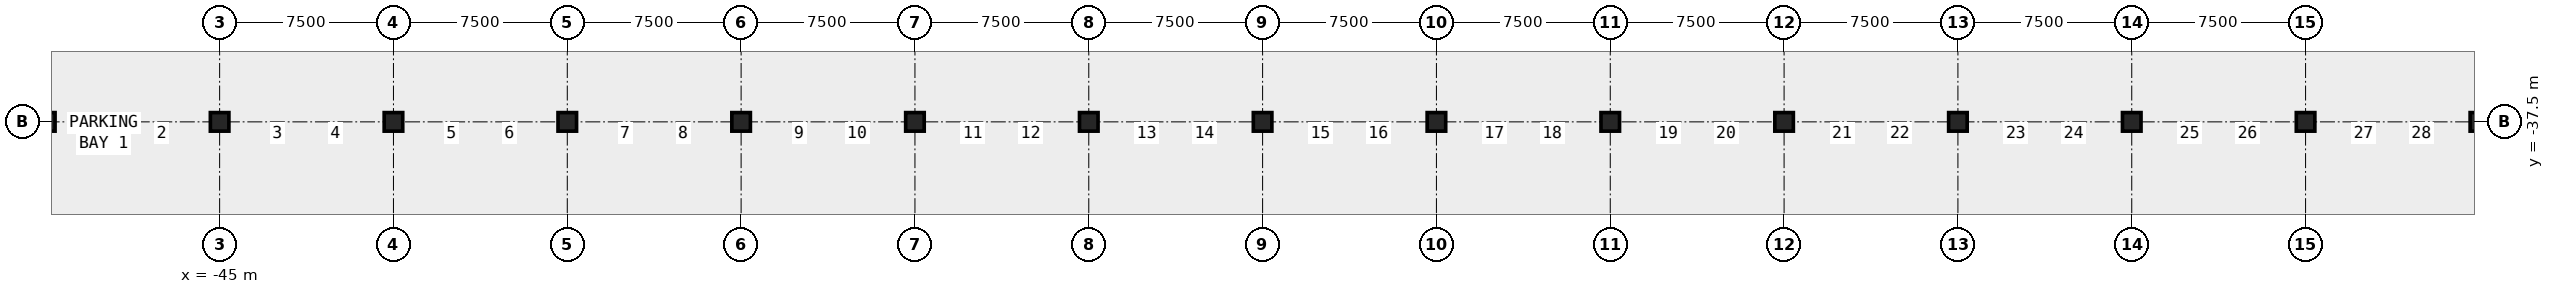
"""IFC4 building model, lengths in metres.
Left out: names, types, materials, properties, quantities, classifications, styles, units other than length and angle.
Written with IfcOpenShell. Run it as: python <this file> out.ifc"""

import sys

from ifc_helpers import new_model, si_unit, direction, frame, origin, origin_2d, place, context, subcontext, project, spatial, rectangle, extrude, element, save


model = new_model("IFC4")
c1 = context("Model", 3, precision=1e-05, world=origin(), true_north=direction((0.0, 1.0)))
c2 = subcontext(c1, "Body", "Model", "MODEL_VIEW")
j1 = project(units=[si_unit("LENGTHUNIT", "METRE"), si_unit("PLANEANGLEUNIT", "RADIAN")], contexts=[c1])
p1 = place(None, origin())
s1 = spatial("IfcSite", under=j1, at=p1, CompositionType="ELEMENT")
p2 = place(p1, origin())
s2 = spatial("IfcBuilding", under=s1, at=p2, CompositionType="ELEMENT")
p3 = place(p2, frame((0.0, 0.0, -16.5)))
s3 = spatial("IfcBuildingStorey", under=s2, at=p3, CompositionType="ELEMENT", Elevation=-16.5)
for number, where, z_axis, x_axis in (
    (1, (-52.5, -37.5, -0.4), (0.0, 0.0, 1.0), (1.0, 0.0, 0.0)),
    (2, (-45.0, -37.5, -0.4), (0.0, 0.0, 1.0), (1.0, 0.0, 0.0)),
    (3, (-37.5, -37.5, -0.4), (0.0, 0.0, 1.0), (1.0, 0.0, 0.0)),
    (4, (-30.0, -37.5, -0.4), (0.0, 0.0, 1.0), (1.0, 0.0, 0.0)),
    (5, (-22.5, -37.5, -0.4), (0.0, 0.0, 1.0), (1.0, 0.0, 0.0)),
    (6, (-15.0, -37.5, -0.4), (0.0, 0.0, 1.0), (1.0, 0.0, 0.0)),
    (7, (-7.5, -37.5, -0.4), (0.0, 0.0, 1.0), (1.0, 0.0, 0.0)),
    (8, (0.0, -37.5, -0.4), (0.0, 0.0, 1.0), (1.0, 0.0, 0.0)),
    (9, (7.5, -37.5, -0.4), (0.0, 0.0, 1.0), (1.0, 0.0, 0.0)),
    (10, (15.0, -37.5, -0.4), (0.0, 0.0, 1.0), (1.0, 0.0, 0.0)),
    (11, (22.5, -37.5, -0.4), (0.0, 0.0, 1.0), (1.0, 0.0, 0.0)),
    (12, (30.0, -37.5, -0.4), (0.0, 0.0, 1.0), (1.0, 0.0, 0.0)),
    (13, (37.5, -37.5, -0.4), (0.0, 0.0, 1.0), (1.0, 0.0, 0.0)),
    (14, (45.0, -37.5, -0.4), (0.0, 0.0, 1.0), (1.0, 0.0, 0.0)),
    (15, (52.5, -37.5, -0.4), (0.0, 0.0, 1.0), (1.0, 0.0, 0.0)),
):
    element("IfcColumn", number, at=place(p3, frame(where, z_axis=z_axis, x_axis=x_axis)), inside=s3, PredefinedType="COLUMN", context=c2, shape_type="SweptSolid", body=[
        extrude(rectangle(XDim=0.8, YDim=0.8, at=origin_2d()), origin(), (0.0, 0.0, 1.0), 5.48),
    ])
save(model, sys.argv[1])
